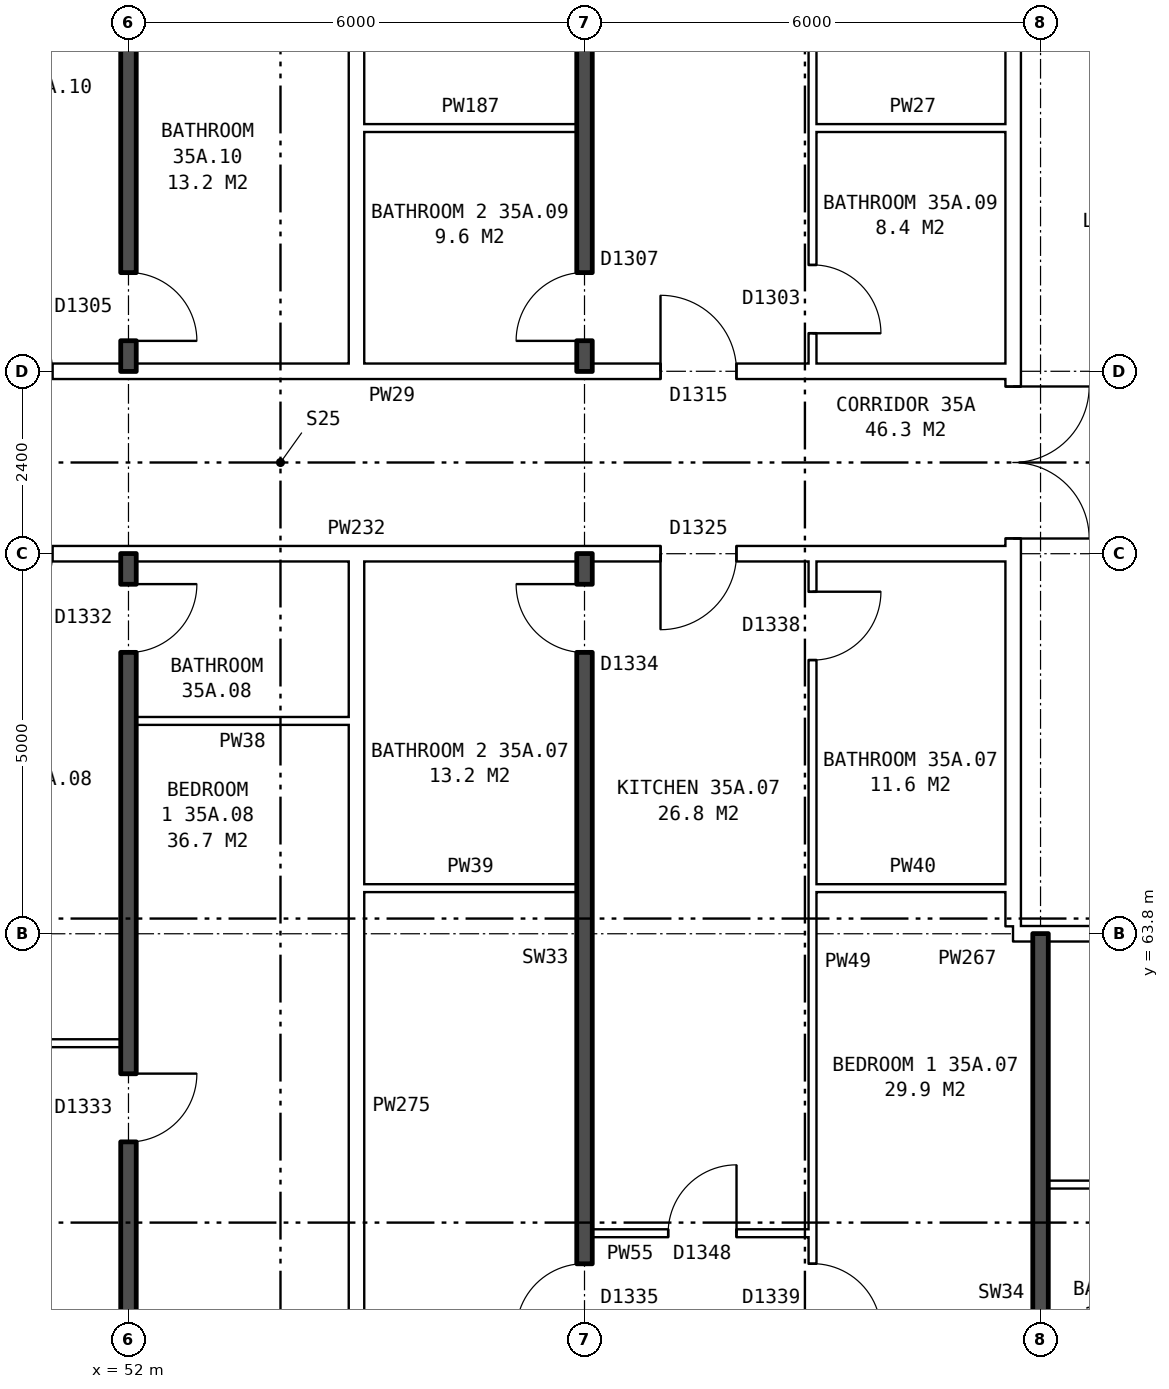
"""IFC4 building model, lengths in metres.
Left out: names, types, materials, properties, quantities, classifications, styles, units other than length and angle.
Written with IfcOpenShell. Run it as: python <this file> out.ifc"""

import sys

from ifc_helpers import new_model, si_unit, direction, frame, frame_2d, origin, place, context, subcontext, project, spatial, rectangle, extrude, element, fill, save


model = new_model("IFC4")
c1 = context("Model", 3, precision=1e-05, world=origin(), true_north=direction((0.0, 1.0)))
c2 = subcontext(c1, "Body", "Model", "MODEL_VIEW")
j1 = project(units=[si_unit("LENGTHUNIT", "METRE"), si_unit("PLANEANGLEUNIT", "RADIAN")], contexts=[c1])
p1 = place(None, origin())
s1 = spatial("IfcSite", under=j1, at=p1, CompositionType="ELEMENT")
p2 = place(p1, origin())
s2 = spatial("IfcBuilding", under=s1, at=p2, CompositionType="ELEMENT")
p3 = place(p2, frame((0.0, 0.0, 126.8)))
s3 = spatial("IfcBuildingStorey", under=s2, at=p3, CompositionType="ELEMENT", Elevation=126.8)
p4 = place(p3, frame((63.64, 63.9, 0.0), z_axis=(0.0, 0.0, 1.0), x_axis=(0.0, 1.0, 0.0)))
e1 = element("IfcWall", 1, at=p4, inside=s3, PredefinedType="PARTITIONING", context=c2, shape_type="SweptSolid", body=[
    extrude(rectangle(XDim=12.2, YDim=0.2, at=frame_2d((6.1, 0.0))), origin(), (0.0, 0.0, 1.0), 2.85),
])
p5 = place(p4, frame((5.1, 0.0, 0.0)))
e2 = element("IfcOpeningElement", 2, at=p5, cuts=e1, PredefinedType="OPENING", context=c2, shape_type="SweptSolid", body=[
    extrude(rectangle(XDim=2.0, YDim=2.1, at=frame_2d((1.0, 1.05))), frame((0.0, 0.11, 0.0), z_axis=(0.0, -1.0, 0.0), x_axis=(1.0, 0.0, 0.0)), (0.0, 0.0, 1.0), 0.22),
])
p6 = place(p3, frame((58.1, 59.86, 0.0), z_axis=(0.0, 0.0, 1.0), x_axis=(1.0, 0.0, 0.0)))
e3 = element("IfcWall", 3, at=p6, inside=s3, PredefinedType="PARTITIONING", context=c2, shape_type="SweptSolid", body=[
    extrude(rectangle(XDim=2.9, YDim=0.1, at=frame_2d((1.45, 0.0))), origin(), (0.0, 0.0, 1.0), 2.85),
])
p7 = place(p6, frame((1.0, 0.0, 0.0)))
e4 = element("IfcOpeningElement", 4, at=p7, cuts=e3, PredefinedType="OPENING", context=c2, shape_type="SweptSolid", body=[
    extrude(rectangle(XDim=0.9, YDim=2.1, at=frame_2d((0.45, 1.05))), frame((0.0, 0.06, 0.0), z_axis=(0.0, -1.0, 0.0), x_axis=(1.0, 0.0, 0.0)), (0.0, 0.0, 1.0), 0.12),
])
p8 = place(p3, frame((64.1, 60.5, 0.0), z_axis=(0.0, 0.0, 1.0), x_axis=(1.0, 0.0, 0.0)))
e5 = element("IfcWall", 5, at=p8, inside=s3, PredefinedType="PARTITIONING", context=c2, shape_type="SweptSolid", body=[
    extrude(rectangle(XDim=5.8, YDim=0.1, at=frame_2d((2.9, 0.0))), origin(), (0.0, 0.0, 1.0), 2.85),
])
p9 = place(p8, frame((3.6, 0.0, 0.0)))
e6 = element("IfcOpeningElement", 6, at=p9, cuts=e5, PredefinedType="OPENING", context=c2, shape_type="SweptSolid", body=[
    extrude(rectangle(XDim=0.9, YDim=2.1, at=frame_2d((0.45, 1.05))), frame((0.0, 0.06, 0.0), z_axis=(0.0, -1.0, 0.0), x_axis=(1.0, 0.0, 0.0)), (0.0, 0.0, 1.0), 0.12),
])
p10 = place(p8, frame((0.7, 0.0, 0.0)))
e7 = element("IfcOpeningElement", 7, at=p10, cuts=e5, PredefinedType="OPENING", context=c2, shape_type="SweptSolid", body=[
    extrude(rectangle(XDim=0.9, YDim=2.1, at=frame_2d((0.45, 1.05))), frame((0.0, 0.06, 0.0), z_axis=(0.0, -1.0, 0.0), x_axis=(1.0, 0.0, 0.0)), (0.0, 0.0, 1.0), 0.12),
])
p11 = place(p3, frame((49.0, 62.36, 0.0), z_axis=(0.0, 0.0, 1.0), x_axis=(1.0, 0.0, 0.0)))
e8 = element("IfcWall", 8, at=p11, inside=s3, PredefinedType="PARTITIONING", context=c2, shape_type="SweptSolid", body=[
    extrude(rectangle(XDim=2.9, YDim=0.1, at=frame_2d((1.45, 0.0))), origin(), (0.0, 0.0, 1.0), 2.85),
])
p12 = place(p11, frame((1.0, 0.0, 0.0)))
e9 = element("IfcOpeningElement", 9, at=p12, cuts=e8, PredefinedType="OPENING", context=c2, shape_type="SweptSolid", body=[
    extrude(rectangle(XDim=0.9, YDim=2.1, at=frame_2d((0.45, 1.05))), frame((0.0, 0.06, 0.0), z_axis=(0.0, -1.0, 0.0), x_axis=(1.0, 0.0, 0.0)), (0.0, 0.0, 1.0), 0.12),
])
p13 = place(p3, frame((63.64, 63.8, 0.0), z_axis=(0.0, 0.0, 1.0), x_axis=(1.0, 0.0, 0.0)))
e10 = element("IfcWall", 10, at=p13, inside=s3, PredefinedType="PARTITIONING", context=c2, shape_type="SweptSolid", body=[
    extrude(rectangle(XDim=3.0, YDim=0.2, at=frame_2d((1.5, 0.0))), origin(), (0.0, 0.0, 1.0), 2.85),
])
p14 = place(p13, frame((1.18, 0.0, 0.0)))
e11 = element("IfcOpeningElement", 11, at=p14, cuts=e10, PredefinedType="OPENING", context=c2, shape_type="SweptSolid", body=[
    extrude(rectangle(XDim=1.0, YDim=2.1, at=frame_2d((0.5, 1.05))), frame((0.0, 0.11, 0.0), z_axis=(0.0, -1.0, 0.0), x_axis=(1.0, 0.0, 0.0)), (0.0, 0.0, 1.0), 0.22),
])
p15 = place(p3, frame((55.1, 64.4, 0.0), z_axis=(0.0, 0.0, 1.0), x_axis=(1.0, 0.0, 0.0)))
e12 = element("IfcWall", 12, at=p15, inside=s3, PredefinedType="PARTITIONING", context=c2, shape_type="SweptSolid", body=[
    extrude(rectangle(XDim=2.8, YDim=0.1, at=frame_2d((1.4, 0.0))), origin(), (0.0, 0.0, 1.0), 2.85),
])
p16 = place(p3, frame((61.0, 64.4, 0.0), z_axis=(0.0, 0.0, 1.0), x_axis=(1.0, 0.0, 0.0)))
e13 = element("IfcWall", 13, at=p16, inside=s3, PredefinedType="PARTITIONING", context=c2, shape_type="SweptSolid", body=[
    extrude(rectangle(XDim=2.64, YDim=0.1, at=frame_2d((1.32, 0.0))), origin(), (0.0, 0.0, 1.0), 2.85),
])
p17 = place(p3, frame((52.1, 66.6, 0.0), z_axis=(0.0, 0.0, 1.0), x_axis=(1.0, 0.0, 0.0)))
e14 = element("IfcWall", 14, at=p17, inside=s3, PredefinedType="PARTITIONING", context=c2, shape_type="SweptSolid", body=[
    extrude(rectangle(XDim=2.8, YDim=0.1, at=frame_2d((1.4, 0.0))), origin(), (0.0, 0.0, 1.0), 2.85),
])
p18 = place(p3, frame((44.36, 68.8, 0.0), z_axis=(0.0, 0.0, 1.0), x_axis=(1.0, 0.0, 0.0)))
e15 = element("IfcWall", 15, at=p18, inside=s3, PredefinedType="PARTITIONING", context=c2, shape_type="SweptSolid", body=[
    extrude(rectangle(XDim=19.28, YDim=0.2, at=frame_2d((9.64, 0.0))), origin(), (0.0, 0.0, 1.0), 2.85),
])
p19 = place(p18, frame((14.64, 0.0, 0.0)))
e16 = element("IfcOpeningElement", 16, at=p19, cuts=e15, PredefinedType="OPENING", context=c2, shape_type="SweptSolid", body=[
    extrude(rectangle(XDim=1.0, YDim=2.1, at=frame_2d((0.5, 1.05))), frame((0.0, 0.11, 0.0), z_axis=(0.0, -1.0, 0.0), x_axis=(1.0, 0.0, 0.0)), (0.0, 0.0, 1.0), 0.22),
])
p20 = place(p18, frame((5.64, 0.0, 0.0)))
e17 = element("IfcOpeningElement", 17, at=p20, cuts=e15, PredefinedType="OPENING", context=c2, shape_type="SweptSolid", body=[
    extrude(rectangle(XDim=1.0, YDim=2.1, at=frame_2d((0.5, 1.05))), frame((0.0, 0.11, 0.0), z_axis=(0.0, -1.0, 0.0), x_axis=(1.0, 0.0, 0.0)), (0.0, 0.0, 1.0), 0.22),
])
p21 = place(p3, frame((44.36, 71.2, 0.0), z_axis=(0.0, 0.0, 1.0), x_axis=(1.0, 0.0, 0.0)))
e18 = element("IfcWall", 18, at=p21, inside=s3, PredefinedType="PARTITIONING", context=c2, shape_type="SweptSolid", body=[
    extrude(rectangle(XDim=19.28, YDim=0.2, at=frame_2d((9.64, 0.0))), origin(), (0.0, 0.0, 1.0), 2.85),
])
p22 = place(p21, frame((14.64, 0.0, 0.0)))
e19 = element("IfcOpeningElement", 19, at=p22, cuts=e18, PredefinedType="OPENING", context=c2, shape_type="SweptSolid", body=[
    extrude(rectangle(XDim=1.0, YDim=2.1, at=frame_2d((0.5, 1.05))), frame((0.0, 0.11, 0.0), z_axis=(0.0, -1.0, 0.0), x_axis=(1.0, 0.0, 0.0)), (0.0, 0.0, 1.0), 0.22),
])
p23 = place(p21, frame((5.64, 0.0, 0.0)))
e20 = element("IfcOpeningElement", 20, at=p23, cuts=e18, PredefinedType="OPENING", context=c2, shape_type="SweptSolid", body=[
    extrude(rectangle(XDim=1.0, YDim=2.1, at=frame_2d((0.5, 1.05))), frame((0.0, 0.11, 0.0), z_axis=(0.0, -1.0, 0.0), x_axis=(1.0, 0.0, 0.0)), (0.0, 0.0, 1.0), 0.22),
])
p24 = place(p3, frame((55.1, 74.4, 0.0), z_axis=(0.0, 0.0, 1.0), x_axis=(1.0, 0.0, 0.0)))
e21 = element("IfcWall", 21, at=p24, inside=s3, PredefinedType="PARTITIONING", context=c2, shape_type="SweptSolid", body=[
    extrude(rectangle(XDim=2.8, YDim=0.1, at=frame_2d((1.4, 0.0))), origin(), (0.0, 0.0, 1.0), 2.85),
])
p25 = place(p3, frame((61.0, 74.4, 0.0), z_axis=(0.0, 0.0, 1.0), x_axis=(1.0, 0.0, 0.0)))
e22 = element("IfcWall", 22, at=p25, inside=s3, PredefinedType="PARTITIONING", context=c2, shape_type="SweptSolid", body=[
    extrude(rectangle(XDim=2.64, YDim=0.1, at=frame_2d((1.32, 0.0))), origin(), (0.0, 0.0, 1.0), 2.85),
])
p26 = place(p3, frame((52.0, 54.36, 0.0), z_axis=(0.0, 0.0, 1.0), x_axis=(0.0, 1.0, 0.0)))
e23 = element("IfcWall", 23, at=p26, inside=s3, PredefinedType="SOLIDWALL", context=c2, shape_type="SweptSolid", body=[
    extrude(rectangle(XDim=14.44, YDim=0.2, at=frame_2d((7.22, 0.0))), origin(), (0.0, 0.0, 1.0), 2.85),
])
p27 = place(p26, frame((6.7, 0.0, 0.0)))
e24 = element("IfcOpeningElement", 24, at=p27, cuts=e23, PredefinedType="OPENING", context=c2, shape_type="SweptSolid", body=[
    extrude(rectangle(XDim=0.9, YDim=2.1, at=frame_2d((0.45, 1.05))), frame((0.0, 0.11, 0.0), z_axis=(0.0, -1.0, 0.0), x_axis=(1.0, 0.0, 0.0)), (0.0, 0.0, 1.0), 0.22),
])
p28 = place(p26, frame((13.14, 0.0, 0.0)))
e25 = element("IfcOpeningElement", 25, at=p28, cuts=e23, PredefinedType="OPENING", context=c2, shape_type="SweptSolid", body=[
    extrude(rectangle(XDim=0.9, YDim=2.1, at=frame_2d((0.45, 1.05))), frame((0.0, 0.11, 0.0), z_axis=(0.0, -1.0, 0.0), x_axis=(1.0, 0.0, 0.0)), (0.0, 0.0, 1.0), 0.22),
])
p29 = place(p3, frame((52.0, 71.2, 0.0), z_axis=(0.0, 0.0, 1.0), x_axis=(0.0, 1.0, 0.0)))
e26 = element("IfcWall", 26, at=p29, inside=s3, PredefinedType="SOLIDWALL", context=c2, shape_type="SweptSolid", body=[
    extrude(rectangle(XDim=14.44, YDim=0.2, at=frame_2d((7.22, 0.0))), origin(), (0.0, 0.0, 1.0), 2.85),
])
p30 = place(p29, frame((6.84, 0.0, 0.0)))
e27 = element("IfcOpeningElement", 27, at=p30, cuts=e26, PredefinedType="OPENING", context=c2, shape_type="SweptSolid", body=[
    extrude(rectangle(XDim=0.9, YDim=2.1, at=frame_2d((0.45, 1.05))), frame((0.0, 0.11, 0.0), z_axis=(0.0, -1.0, 0.0), x_axis=(1.0, 0.0, 0.0)), (0.0, 0.0, 1.0), 0.22),
])
p31 = place(p29, frame((0.4, 0.0, 0.0)))
e28 = element("IfcOpeningElement", 28, at=p31, cuts=e26, PredefinedType="OPENING", context=c2, shape_type="SweptSolid", body=[
    extrude(rectangle(XDim=0.9, YDim=2.1, at=frame_2d((0.45, 1.05))), frame((0.0, 0.11, 0.0), z_axis=(0.0, -1.0, 0.0), x_axis=(1.0, 0.0, 0.0)), (0.0, 0.0, 1.0), 0.22),
])
for number, where, z_axis, x_axis in (
    (29, (55.0, 54.36, 0.0), (0.0, 0.0, 1.0), (0.0, 1.0, 0.0)),
    (30, (55.0, 71.3, 0.0), (0.0, 0.0, 1.0), (0.0, 1.0, 0.0)),
):
    element("IfcWall", number, at=place(p3, frame(where, z_axis=z_axis, x_axis=x_axis)), inside=s3, PredefinedType="PARTITIONING", context=c2, shape_type="SweptSolid", body=[
        extrude(rectangle(XDim=14.34, YDim=0.2, at=frame_2d((7.17, 0.0))), origin(), (0.0, 0.0, 1.0), 2.85),
    ])
p32 = place(p3, frame((58.0, 54.36, 0.0), z_axis=(0.0, 0.0, 1.0), x_axis=(0.0, 1.0, 0.0)))
e31 = element("IfcWall", 31, at=p32, inside=s3, PredefinedType="SOLIDWALL", context=c2, shape_type="SweptSolid", body=[
    extrude(rectangle(XDim=14.44, YDim=0.2, at=frame_2d((7.22, 0.0))), origin(), (0.0, 0.0, 1.0), 2.85),
])
p33 = place(p32, frame((4.2, 0.0, 0.0)))
e32 = element("IfcOpeningElement", 32, at=p33, cuts=e31, PredefinedType="OPENING", context=c2, shape_type="SweptSolid", body=[
    extrude(rectangle(XDim=0.9, YDim=2.1, at=frame_2d((0.45, 1.05))), frame((0.0, 0.11, 0.0), z_axis=(0.0, -1.0, 0.0), x_axis=(1.0, 0.0, 0.0)), (0.0, 0.0, 1.0), 0.22),
])
p34 = place(p32, frame((13.14, 0.0, 0.0)))
e33 = element("IfcOpeningElement", 33, at=p34, cuts=e31, PredefinedType="OPENING", context=c2, shape_type="SweptSolid", body=[
    extrude(rectangle(XDim=0.9, YDim=2.1, at=frame_2d((0.45, 1.05))), frame((0.0, 0.11, 0.0), z_axis=(0.0, -1.0, 0.0), x_axis=(1.0, 0.0, 0.0)), (0.0, 0.0, 1.0), 0.22),
])
p35 = place(p3, frame((58.0, 71.2, 0.0), z_axis=(0.0, 0.0, 1.0), x_axis=(0.0, 1.0, 0.0)))
e34 = element("IfcWall", 34, at=p35, inside=s3, PredefinedType="SOLIDWALL", context=c2, shape_type="SweptSolid", body=[
    extrude(rectangle(XDim=14.44, YDim=0.2, at=frame_2d((7.22, 0.0))), origin(), (0.0, 0.0, 1.0), 2.85),
])
p36 = place(p35, frame((9.34, 0.0, 0.0)))
e35 = element("IfcOpeningElement", 35, at=p36, cuts=e34, PredefinedType="OPENING", context=c2, shape_type="SweptSolid", body=[
    extrude(rectangle(XDim=0.9, YDim=2.1, at=frame_2d((0.45, 1.05))), frame((0.0, 0.11, 0.0), z_axis=(0.0, -1.0, 0.0), x_axis=(1.0, 0.0, 0.0)), (0.0, 0.0, 1.0), 0.22),
])
p37 = place(p35, frame((0.4, 0.0, 0.0)))
e36 = element("IfcOpeningElement", 36, at=p37, cuts=e34, PredefinedType="OPENING", context=c2, shape_type="SweptSolid", body=[
    extrude(rectangle(XDim=0.9, YDim=2.1, at=frame_2d((0.45, 1.05))), frame((0.0, 0.11, 0.0), z_axis=(0.0, -1.0, 0.0), x_axis=(1.0, 0.0, 0.0)), (0.0, 0.0, 1.0), 0.22),
])
p38 = place(p3, frame((61.0, 54.36, 0.0), z_axis=(0.0, 0.0, 1.0), x_axis=(0.0, 1.0, 0.0)))
e37 = element("IfcWall", 37, at=p38, inside=s3, PredefinedType="PARTITIONING", context=c2, shape_type="SweptSolid", body=[
    extrude(rectangle(XDim=14.34, YDim=0.1, at=frame_2d((7.17, 0.0))), origin(), (0.0, 0.0, 1.0), 2.85),
])
p39 = place(p38, frame((4.2, 0.0, 0.0)))
e38 = element("IfcOpeningElement", 38, at=p39, cuts=e37, PredefinedType="OPENING", context=c2, shape_type="SweptSolid", body=[
    extrude(rectangle(XDim=0.9, YDim=2.1, at=frame_2d((0.45, 1.05))), frame((0.0, 0.06, 0.0), z_axis=(0.0, -1.0, 0.0), x_axis=(1.0, 0.0, 0.0)), (0.0, 0.0, 1.0), 0.12),
])
p40 = place(p38, frame((13.04, 0.0, 0.0)))
e39 = element("IfcOpeningElement", 39, at=p40, cuts=e37, PredefinedType="OPENING", context=c2, shape_type="SweptSolid", body=[
    extrude(rectangle(XDim=0.9, YDim=2.1, at=frame_2d((0.45, 1.05))), frame((0.0, 0.06, 0.0), z_axis=(0.0, -1.0, 0.0), x_axis=(1.0, 0.0, 0.0)), (0.0, 0.0, 1.0), 0.12),
])
p41 = place(p3, frame((61.0, 71.3, 0.0), z_axis=(0.0, 0.0, 1.0), x_axis=(0.0, 1.0, 0.0)))
e40 = element("IfcWall", 40, at=p41, inside=s3, PredefinedType="PARTITIONING", context=c2, shape_type="SweptSolid", body=[
    extrude(rectangle(XDim=14.34, YDim=0.1, at=frame_2d((7.17, 0.0))), origin(), (0.0, 0.0, 1.0), 2.85),
])
p42 = place(p41, frame((9.24, 0.0, 0.0)))
e41 = element("IfcOpeningElement", 41, at=p42, cuts=e40, PredefinedType="OPENING", context=c2, shape_type="SweptSolid", body=[
    extrude(rectangle(XDim=0.9, YDim=2.1, at=frame_2d((0.45, 1.05))), frame((0.0, 0.06, 0.0), z_axis=(0.0, -1.0, 0.0), x_axis=(1.0, 0.0, 0.0)), (0.0, 0.0, 1.0), 0.12),
])
p43 = place(p41, frame((0.4, 0.0, 0.0)))
e42 = element("IfcOpeningElement", 42, at=p43, cuts=e40, PredefinedType="OPENING", context=c2, shape_type="SweptSolid", body=[
    extrude(rectangle(XDim=0.9, YDim=2.1, at=frame_2d((0.45, 1.05))), frame((0.0, 0.06, 0.0), z_axis=(0.0, -1.0, 0.0), x_axis=(1.0, 0.0, 0.0)), (0.0, 0.0, 1.0), 0.12),
])
p44 = place(p3, frame((64.0, 54.36, 0.0), z_axis=(0.0, 0.0, 1.0), x_axis=(0.0, 1.0, 0.0)))
e43 = element("IfcWall", 43, at=p44, inside=s3, PredefinedType="SOLIDWALL", context=c2, shape_type="SweptSolid", body=[
    extrude(rectangle(XDim=9.44, YDim=0.2, at=frame_2d((4.72, 0.0))), origin(), (0.0, 0.0, 1.0), 2.85),
])
p45 = place(p5, frame((2.0, 0.0, 0.0), z_axis=(0.0, 0.0, 1.0), x_axis=(-1.0, 0.0, 0.0)))
e44 = element("IfcDoor", 44, at=p45, inside=s3, OperationType="DOUBLE_DOOR_SINGLE_SWING", PredefinedType="DOOR", context=c2, shape_type="SweptSolid", body=[
    extrude(rectangle(XDim=2.0, YDim=2.1, at=frame_2d((1.0, 1.05))), frame((0.0, 0.025, 0.0), z_axis=(0.0, -1.0, 0.0), x_axis=(1.0, 0.0, 0.0)), (0.0, 0.0, 1.0), 0.05),
])
fill(e2, e44)
p46 = place(p39, frame((0.9, 0.0, 0.0), z_axis=(0.0, 0.0, 1.0), x_axis=(-1.0, 0.0, 0.0)))
e45 = element("IfcDoor", 45, at=p46, inside=s3, OperationType="SINGLE_SWING_RIGHT", PredefinedType="DOOR", context=c2, shape_type="SweptSolid", body=[
    extrude(rectangle(XDim=0.9, YDim=2.1, at=frame_2d((0.45, 1.05))), frame((0.0, 0.025, 0.0), z_axis=(0.0, -1.0, 0.0), x_axis=(1.0, 0.0, 0.0)), (0.0, 0.0, 1.0), 0.05),
])
fill(e38, e45)
p47 = place(p33, origin())
e46 = element("IfcDoor", 46, at=p47, inside=s3, OperationType="SINGLE_SWING_LEFT", PredefinedType="DOOR", context=c2, shape_type="SweptSolid", body=[
    extrude(rectangle(XDim=0.9, YDim=2.1, at=frame_2d((0.45, 1.05))), frame((0.0, 0.025, 0.0), z_axis=(0.0, -1.0, 0.0), x_axis=(1.0, 0.0, 0.0)), (0.0, 0.0, 1.0), 0.05),
])
fill(e32, e46)
p48 = place(p19, frame((1.0, 0.0, 0.0), z_axis=(0.0, 0.0, 1.0), x_axis=(-1.0, 0.0, 0.0)))
e47 = element("IfcDoor", 47, at=p48, inside=s3, OperationType="SINGLE_SWING_RIGHT", PredefinedType="DOOR", context=c2, shape_type="SweptSolid", body=[
    extrude(rectangle(XDim=1.0, YDim=2.1, at=frame_2d((0.5, 1.05))), frame((0.0, 0.025, 0.0), z_axis=(0.0, -1.0, 0.0), x_axis=(1.0, 0.0, 0.0)), (0.0, 0.0, 1.0), 0.05),
])
fill(e16, e47)
p49 = place(p7, origin())
e48 = element("IfcDoor", 48, at=p49, inside=s3, OperationType="SINGLE_SWING_RIGHT", PredefinedType="DOOR", context=c2, shape_type="SweptSolid", body=[
    extrude(rectangle(XDim=0.9, YDim=2.1, at=frame_2d((0.45, 1.05))), frame((0.0, 0.025, 0.0), z_axis=(0.0, -1.0, 0.0), x_axis=(1.0, 0.0, 0.0)), (0.0, 0.0, 1.0), 0.05),
])
fill(e4, e48)
p50 = place(p40, frame((0.9, 0.0, 0.0), z_axis=(0.0, 0.0, 1.0), x_axis=(-1.0, 0.0, 0.0)))
e49 = element("IfcDoor", 49, at=p50, inside=s3, OperationType="SINGLE_SWING_LEFT", PredefinedType="DOOR", context=c2, shape_type="SweptSolid", body=[
    extrude(rectangle(XDim=0.9, YDim=2.1, at=frame_2d((0.45, 1.05))), frame((0.0, 0.025, 0.0), z_axis=(0.0, -1.0, 0.0), x_axis=(1.0, 0.0, 0.0)), (0.0, 0.0, 1.0), 0.05),
])
fill(e39, e49)
p51 = place(p34, origin())
e50 = element("IfcDoor", 50, at=p51, inside=s3, OperationType="SINGLE_SWING_RIGHT", PredefinedType="DOOR", context=c2, shape_type="SweptSolid", body=[
    extrude(rectangle(XDim=0.9, YDim=2.1, at=frame_2d((0.45, 1.05))), frame((0.0, 0.025, 0.0), z_axis=(0.0, -1.0, 0.0), x_axis=(1.0, 0.0, 0.0)), (0.0, 0.0, 1.0), 0.05),
])
fill(e33, e50)
p52 = place(p27, frame((0.9, 0.0, 0.0), z_axis=(0.0, 0.0, 1.0), x_axis=(-1.0, 0.0, 0.0)))
e51 = element("IfcDoor", 51, at=p52, inside=s3, OperationType="SINGLE_SWING_LEFT", PredefinedType="DOOR", context=c2, shape_type="SweptSolid", body=[
    extrude(rectangle(XDim=0.9, YDim=2.1, at=frame_2d((0.45, 1.05))), frame((0.0, 0.025, 0.0), z_axis=(0.0, -1.0, 0.0), x_axis=(1.0, 0.0, 0.0)), (0.0, 0.0, 1.0), 0.05),
])
fill(e24, e51)
p53 = place(p28, frame((0.9, 0.0, 0.0), z_axis=(0.0, 0.0, 1.0), x_axis=(-1.0, 0.0, 0.0)))
e52 = element("IfcDoor", 52, at=p53, inside=s3, OperationType="SINGLE_SWING_LEFT", PredefinedType="DOOR", context=c2, shape_type="SweptSolid", body=[
    extrude(rectangle(XDim=0.9, YDim=2.1, at=frame_2d((0.45, 1.05))), frame((0.0, 0.025, 0.0), z_axis=(0.0, -1.0, 0.0), x_axis=(1.0, 0.0, 0.0)), (0.0, 0.0, 1.0), 0.05),
])
fill(e25, e52)
p54 = place(p22, origin())
e53 = element("IfcDoor", 53, at=p54, inside=s3, OperationType="SINGLE_SWING_LEFT", PredefinedType="DOOR", context=c2, shape_type="SweptSolid", body=[
    extrude(rectangle(XDim=1.0, YDim=2.1, at=frame_2d((0.5, 1.05))), frame((0.0, 0.025, 0.0), z_axis=(0.0, -1.0, 0.0), x_axis=(1.0, 0.0, 0.0)), (0.0, 0.0, 1.0), 0.05),
])
fill(e19, e53)
p55 = place(p43, frame((0.9, 0.0, 0.0), z_axis=(0.0, 0.0, 1.0), x_axis=(-1.0, 0.0, 0.0)))
e54 = element("IfcDoor", 54, at=p55, inside=s3, OperationType="SINGLE_SWING_RIGHT", PredefinedType="DOOR", context=c2, shape_type="SweptSolid", body=[
    extrude(rectangle(XDim=0.9, YDim=2.1, at=frame_2d((0.45, 1.05))), frame((0.0, 0.025, 0.0), z_axis=(0.0, -1.0, 0.0), x_axis=(1.0, 0.0, 0.0)), (0.0, 0.0, 1.0), 0.05),
])
fill(e42, e54)
p56 = place(p37, origin())
e55 = element("IfcDoor", 55, at=p56, inside=s3, OperationType="SINGLE_SWING_LEFT", PredefinedType="DOOR", context=c2, shape_type="SweptSolid", body=[
    extrude(rectangle(XDim=0.9, YDim=2.1, at=frame_2d((0.45, 1.05))), frame((0.0, 0.025, 0.0), z_axis=(0.0, -1.0, 0.0), x_axis=(1.0, 0.0, 0.0)), (0.0, 0.0, 1.0), 0.05),
])
fill(e36, e55)
p57 = place(p31, frame((0.9, 0.0, 0.0), z_axis=(0.0, 0.0, 1.0), x_axis=(-1.0, 0.0, 0.0)))
e56 = element("IfcDoor", 56, at=p57, inside=s3, OperationType="SINGLE_SWING_RIGHT", PredefinedType="DOOR", context=c2, shape_type="SweptSolid", body=[
    extrude(rectangle(XDim=0.9, YDim=2.1, at=frame_2d((0.45, 1.05))), frame((0.0, 0.025, 0.0), z_axis=(0.0, -1.0, 0.0), x_axis=(1.0, 0.0, 0.0)), (0.0, 0.0, 1.0), 0.05),
])
fill(e28, e56)
save(model, sys.argv[1])
